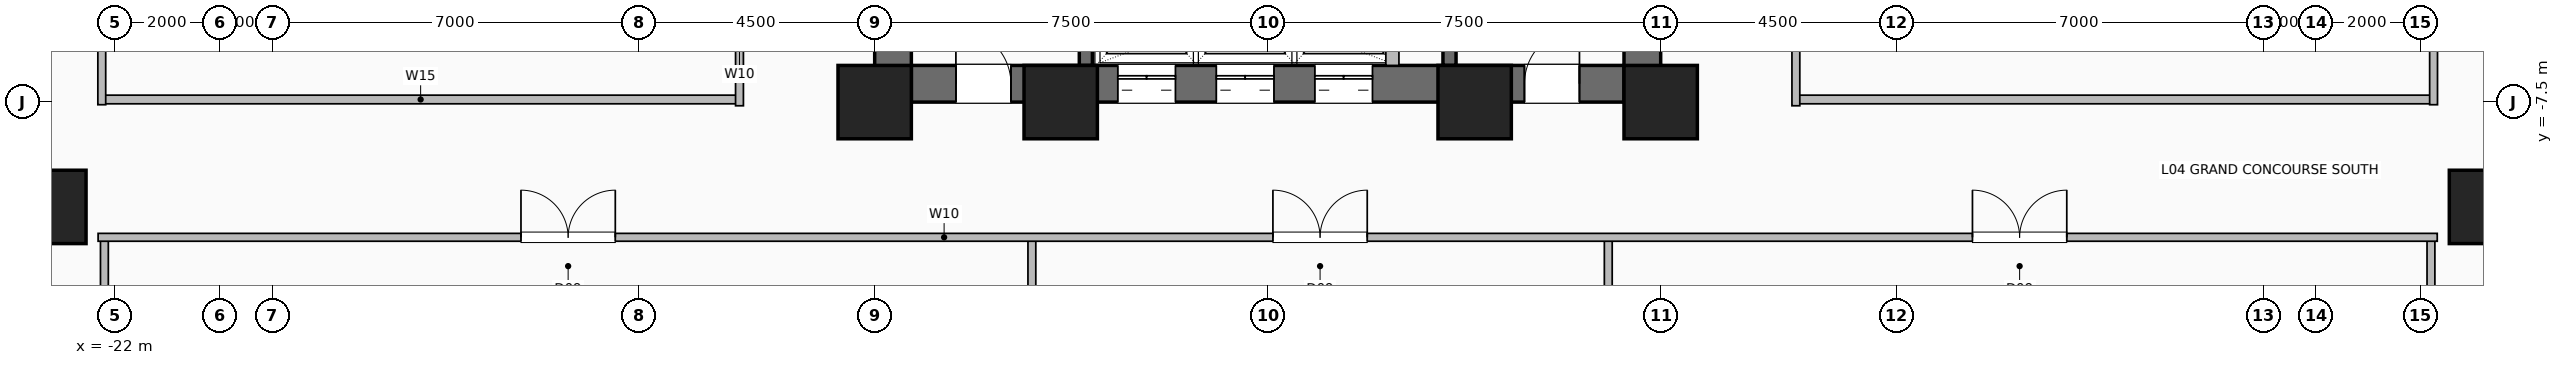
"""IFC4 building model, lengths in metres.
Left out: names, types, materials, properties, quantities, classifications, styles, units other than length and angle.
Written with IfcOpenShell. Run it as: python <this file> out.ifc"""

import sys

from ifc_helpers import new_model, si_unit, direction, frame, frame_2d, origin, origin_2d, place, context, subcontext, project, spatial, rectangle, hollow_rectangle, extrude, element, fill, save


model = new_model("IFC4")
c1 = context("Model", 3, precision=1e-05, world=origin(), true_north=direction((0.0, 1.0)))
c2 = subcontext(c1, "Body", "Model", "MODEL_VIEW")
j1 = project(units=[si_unit("LENGTHUNIT", "METRE"), si_unit("PLANEANGLEUNIT", "RADIAN")], contexts=[c1])
p1 = place(None, origin())
s1 = spatial("IfcSite", under=j1, at=p1, CompositionType="ELEMENT")
p2 = place(p1, origin())
s2 = spatial("IfcBuilding", under=s1, at=p2, CompositionType="ELEMENT")
p3 = place(p2, frame((0.0, 0.0, 21.6)))
s3 = spatial("IfcBuildingStorey", under=s2, at=p3, CompositionType="ELEMENT", Elevation=21.6)
for number, where, z_axis, x_axis in (
    (1, (-7.5, -7.5, 0.0), (0.0, 0.0, 1.0), (1.0, 0.0, 0.0)),
    (2, (-3.95, -7.5, 0.0), (0.0, 0.0, 1.0), (1.0, 0.0, 0.0)),
    (3, (3.95, -7.5, 0.0), (0.0, 0.0, 1.0), (1.0, 0.0, 0.0)),
    (4, (7.5, -7.5, 0.0), (0.0, 0.0, 1.0), (1.0, 0.0, 0.0)),
):
    element("IfcColumn", number, at=place(p3, frame(where, z_axis=z_axis, x_axis=x_axis)), inside=s3, PredefinedType="COLUMN", context=c2, shape_type="SweptSolid", body=[
        extrude(hollow_rectangle(XDim=1.4, YDim=1.4, WallThickness=0.06, at=origin_2d()), origin(), (0.0, 0.0, 1.0), 5.4),
    ])
for number, where, z_axis, x_axis in (
    (5, (-23.25, -9.5, 0.0), (0.0, 0.0, 1.0), (1.0, 0.0, 0.0)),
    (6, (23.25, -9.5, 0.0), (0.0, 0.0, 1.0), (1.0, 0.0, 0.0)),
):
    element("IfcColumn", number, at=place(p3, frame(where, z_axis=z_axis, x_axis=x_axis)), inside=s3, PredefinedType="COLUMN", context=c2, shape_type="SweptSolid", body=[
        extrude(hollow_rectangle(XDim=1.4, YDim=1.4, WallThickness=0.06, at=origin_2d()), origin(), (0.0, 0.0, 1.0), 5.0),
    ])
p4 = place(p3, frame((-7.5, -7.15, 0.0), z_axis=(0.0, 0.0, 1.0), x_axis=(1.0, 0.0, 0.0)))
e7 = element("IfcWall", 7, at=p4, inside=s3, PredefinedType="SHEAR", context=c2, shape_type="SweptSolid", body=[
    extrude(rectangle(XDim=15.0, YDim=0.7, at=frame_2d((7.5, 0.0))), origin(), (0.0, 0.0, 1.0), 5.0),
])
p5 = place(p4, frame((1.55, 0.0, 0.0)))
e8 = element("IfcOpeningElement", 8, at=p5, cuts=e7, PredefinedType="OPENING", context=c2, shape_type="SweptSolid", body=[
    extrude(rectangle(XDim=1.05, YDim=2.08, at=frame_2d((0.525, 1.04))), frame((0.0, 0.36, 0.0), z_axis=(0.0, -1.0, 0.0), x_axis=(1.0, 0.0, 0.0)), (0.0, 0.0, 1.0), 0.72),
])
p6 = place(p4, frame((12.4, 0.0, 0.0)))
e9 = element("IfcOpeningElement", 9, at=p6, cuts=e7, PredefinedType="OPENING", context=c2, shape_type="SweptSolid", body=[
    extrude(rectangle(XDim=1.05, YDim=2.08, at=frame_2d((0.525, 1.04))), frame((0.0, 0.36, 0.0), z_axis=(0.0, -1.0, 0.0), x_axis=(1.0, 0.0, 0.0)), (0.0, 0.0, 1.0), 0.72),
])
p7 = place(p4, frame((4.64, 0.0, 0.0)))
e10 = element("IfcOpeningElement", 10, at=p7, cuts=e7, PredefinedType="OPENING", context=c2, shape_type="SweptSolid", body=[
    extrude(rectangle(XDim=1.1, YDim=2.2, at=frame_2d((0.55, 1.1))), frame((0.0, 0.36, 0.0), z_axis=(0.0, -1.0, 0.0), x_axis=(1.0, 0.0, 0.0)), (0.0, 0.0, 1.0), 0.72),
])
p8 = place(p4, frame((6.52, 0.0, 0.0)))
e11 = element("IfcOpeningElement", 11, at=p8, cuts=e7, PredefinedType="OPENING", context=c2, shape_type="SweptSolid", body=[
    extrude(rectangle(XDim=1.1, YDim=2.2, at=frame_2d((0.55, 1.1))), frame((0.0, 0.36, 0.0), z_axis=(0.0, -1.0, 0.0), x_axis=(1.0, 0.0, 0.0)), (0.0, 0.0, 1.0), 0.72),
])
p9 = place(p4, frame((8.4, 0.0, 0.0)))
e12 = element("IfcOpeningElement", 12, at=p9, cuts=e7, PredefinedType="OPENING", context=c2, shape_type="SweptSolid", body=[
    extrude(rectangle(XDim=1.1, YDim=2.2, at=frame_2d((0.55, 1.1))), frame((0.0, 0.36, 0.0), z_axis=(0.0, -1.0, 0.0), x_axis=(1.0, 0.0, 0.0)), (0.0, 0.0, 1.0), 0.72),
])
p10 = place(p3, frame((-7.15, -7.5, 0.0), z_axis=(0.0, 0.0, 1.0), x_axis=(0.0, 1.0, 0.0)))
e13 = element("IfcWall", 13, at=p10, inside=s3, PredefinedType="SHEAR", context=c2, shape_type="SweptSolid", body=[
    extrude(rectangle(XDim=15.0, YDim=0.7, at=frame_2d((7.5, 0.0))), origin(), (0.0, 0.0, 1.0), 5.0),
])
p11 = place(p10, frame((9.5, 0.0, 0.0)))
e14 = element("IfcOpeningElement", 14, at=p11, cuts=e13, PredefinedType="OPENING", context=c2, shape_type="SweptSolid", body=[
    extrude(rectangle(XDim=1.0, YDim=2.08, at=frame_2d((0.5, 1.04))), frame((0.0, 0.36, 0.0), z_axis=(0.0, -1.0, 0.0), x_axis=(1.0, 0.0, 0.0)), (0.0, 0.0, 1.0), 0.72),
])
p12 = place(p3, frame((7.15, -7.5, 0.0), z_axis=(0.0, 0.0, 1.0), x_axis=(0.0, 1.0, 0.0)))
e15 = element("IfcWall", 15, at=p12, inside=s3, PredefinedType="SHEAR", context=c2, shape_type="SweptSolid", body=[
    extrude(rectangle(XDim=15.0, YDim=0.7, at=frame_2d((7.5, 0.0))), origin(), (0.0, 0.0, 1.0), 5.0),
])
p13 = place(p12, frame((12.6, 0.0, 0.0)))
e16 = element("IfcOpeningElement", 16, at=p13, cuts=e15, PredefinedType="OPENING", context=c2, shape_type="SweptSolid", body=[
    extrude(rectangle(XDim=1.2, YDim=2.2, at=frame_2d((0.6, 1.1))), frame((0.0, 0.36, 0.0), z_axis=(0.0, -1.0, 0.0), x_axis=(1.0, 0.0, 0.0)), (0.0, 0.0, 1.0), 0.72),
])
for number, where, z_axis, x_axis in (
    (17, (-3.47, -6.8, 0.0), (0.0, 0.0, 1.0), (0.0, 1.0, 0.0)),
    (18, (3.47, -6.8, 0.0), (0.0, 0.0, 1.0), (0.0, 1.0, 0.0)),
):
    element("IfcWall", number, at=place(p3, frame(where, z_axis=z_axis, x_axis=x_axis)), inside=s3, PredefinedType="SHEAR", context=c2, shape_type="SweptSolid", body=[
        extrude(rectangle(XDim=7.72, YDim=0.25, at=frame_2d((3.86, 0.0))), origin(), (0.0, 0.0, 1.0), 5.0),
    ])
p14 = place(p3, frame((2.38, -6.8, 0.0), z_axis=(0.0, 0.0, 1.0), x_axis=(0.0, 1.0, 0.0)))
e19 = element("IfcWall", 19, at=p14, inside=s3, PredefinedType="SHEAR", context=c2, shape_type="SweptSolid", body=[
    extrude(rectangle(XDim=2.22, YDim=0.25, at=frame_2d((1.11, 0.0))), origin(), (0.0, 0.0, 1.0), 5.0),
])
for number, where, z_axis, x_axis in (
    (20, (-22.2, -22.2, 0.0), (0.0, 0.0, 1.0), (0.0, 1.0, 0.0)),
    (21, (-4.5, -22.2, 0.0), (0.0, 0.0, 1.0), (0.0, 1.0, 0.0)),
    (22, (6.5, -22.2, 0.0), (0.0, 0.0, 1.0), (0.0, 1.0, 0.0)),
    (23, (22.2, -22.2, 0.0), (0.0, 0.0, 1.0), (0.0, 1.0, 0.0)),
):
    element("IfcWall", number, at=place(p3, frame(where, z_axis=z_axis, x_axis=x_axis)), inside=s3, PredefinedType="PARTITIONING", context=c2, shape_type="SweptSolid", body=[
        extrude(rectangle(XDim=12.12, YDim=0.15, at=frame_2d((6.06, 0.0))), origin(), (0.0, 0.0, 1.0), 5.0),
    ])
p15 = place(p3, frame((-22.32, -10.08, 0.0), z_axis=(0.0, 0.0, 1.0), x_axis=(1.0, 0.0, 0.0)))
e24 = element("IfcWall", 24, at=p15, inside=s3, PredefinedType="PARTITIONING", context=c2, shape_type="SweptSolid", body=[
    extrude(rectangle(XDim=44.64, YDim=0.15, at=frame_2d((22.32, 0.0))), origin(), (0.0, 0.0, 1.0), 5.0),
])
p16 = place(p15, frame((8.07, 0.0, 0.0)))
e25 = element("IfcOpeningElement", 25, at=p16, cuts=e24, PredefinedType="OPENING", context=c2, shape_type="SweptSolid", body=[
    extrude(rectangle(XDim=1.8, YDim=2.08, at=frame_2d((0.9, 1.04))), frame((0.0, 0.085, 0.0), z_axis=(0.0, -1.0, 0.0), x_axis=(1.0, 0.0, 0.0)), (0.0, 0.0, 1.0), 0.17),
])
p17 = place(p15, frame((22.42, 0.0, 0.0)))
e26 = element("IfcOpeningElement", 26, at=p17, cuts=e24, PredefinedType="OPENING", context=c2, shape_type="SweptSolid", body=[
    extrude(rectangle(XDim=1.8, YDim=2.08, at=frame_2d((0.9, 1.04))), frame((0.0, 0.085, 0.0), z_axis=(0.0, -1.0, 0.0), x_axis=(1.0, 0.0, 0.0)), (0.0, 0.0, 1.0), 0.17),
])
p18 = place(p15, frame((35.77, 0.0, 0.0)))
e27 = element("IfcOpeningElement", 27, at=p18, cuts=e24, PredefinedType="OPENING", context=c2, shape_type="SweptSolid", body=[
    extrude(rectangle(XDim=1.8, YDim=2.08, at=frame_2d((0.9, 1.04))), frame((0.0, 0.085, 0.0), z_axis=(0.0, -1.0, 0.0), x_axis=(1.0, 0.0, 0.0)), (0.0, 0.0, 1.0), 0.17),
])
p19 = place(p3, frame((-22.25, -7.45, 0.0), z_axis=(0.0, 0.0, 1.0), x_axis=(1.0, 0.0, 0.0)))
e28 = element("IfcWall", 28, at=p19, inside=s3, PredefinedType="PLUMBINGWALL", context=c2, shape_type="SweptSolid", body=[
    extrude(rectangle(XDim=12.17, YDim=0.165, at=frame_2d((6.085, 0.0))), origin(), (0.0, 0.0, 1.0), 5.0),
])
p20 = place(p3, frame((-10.08, -7.57, 0.0), z_axis=(0.0, 0.0, 1.0), x_axis=(0.0, 1.0, 0.0)))
e29 = element("IfcWall", 29, at=p20, inside=s3, PredefinedType="PARTITIONING", context=c2, shape_type="SweptSolid", body=[
    extrude(rectangle(XDim=15.14, YDim=0.15, at=frame_2d((7.57, 0.0))), origin(), (0.0, 0.0, 1.0), 5.0),
])
p21 = place(p20, frame((2.37, 0.0, 0.0)))
e30 = element("IfcOpeningElement", 30, at=p21, cuts=e29, PredefinedType="OPENING", context=c2, shape_type="SweptSolid", body=[
    extrude(rectangle(XDim=0.95, YDim=2.06, at=frame_2d((0.475, 1.03))), frame((0.0, 0.085, 0.0), z_axis=(0.0, -1.0, 0.0), x_axis=(1.0, 0.0, 0.0)), (0.0, 0.0, 1.0), 0.17),
])
p22 = place(p20, frame((5.875, 0.0, 0.0)))
e31 = element("IfcOpeningElement", 31, at=p22, cuts=e29, PredefinedType="OPENING", context=c2, shape_type="SweptSolid", body=[
    extrude(rectangle(XDim=0.85, YDim=2.05, at=frame_2d((0.425, 1.025))), frame((0.0, 0.085, 0.0), z_axis=(0.0, -1.0, 0.0), x_axis=(1.0, 0.0, 0.0)), (0.0, 0.0, 1.0), 0.17),
])
p23 = place(p20, frame((8.925, 0.0, 0.0)))
e32 = element("IfcOpeningElement", 32, at=p23, cuts=e29, PredefinedType="OPENING", context=c2, shape_type="SweptSolid", body=[
    extrude(rectangle(XDim=0.95, YDim=2.06, at=frame_2d((0.475, 1.03))), frame((0.0, 0.085, 0.0), z_axis=(0.0, -1.0, 0.0), x_axis=(1.0, 0.0, 0.0)), (0.0, 0.0, 1.0), 0.17),
])
p24 = place(p20, frame((12.08, 0.0, 0.0)))
e33 = element("IfcOpeningElement", 33, at=p24, cuts=e29, PredefinedType="OPENING", context=c2, shape_type="SweptSolid", body=[
    extrude(rectangle(XDim=0.85, YDim=2.05, at=frame_2d((0.425, 1.025))), frame((0.0, 0.085, 0.0), z_axis=(0.0, -1.0, 0.0), x_axis=(1.0, 0.0, 0.0)), (0.0, 0.0, 1.0), 0.17),
])
p25 = place(p20, frame((13.655, 0.0, 0.0)))
e34 = element("IfcOpeningElement", 34, at=p25, cuts=e29, PredefinedType="OPENING", context=c2, shape_type="SweptSolid", body=[
    extrude(rectangle(XDim=0.95, YDim=2.06, at=frame_2d((0.475, 1.03))), frame((0.0, 0.085, 0.0), z_axis=(0.0, -1.0, 0.0), x_axis=(1.0, 0.0, 0.0)), (0.0, 0.0, 1.0), 0.17),
])
p26 = place(p3, frame((10.08, -7.45, 0.0), z_axis=(0.0, 0.0, 1.0), x_axis=(1.0, 0.0, 0.0)))
e35 = element("IfcWall", 35, at=p26, inside=s3, PredefinedType="PLUMBINGWALL", context=c2, shape_type="SweptSolid", body=[
    extrude(rectangle(XDim=12.17, YDim=0.165, at=frame_2d((6.085, 0.0))), origin(), (0.0, 0.0, 1.0), 5.0),
])
p27 = place(p3, frame((10.08, -7.57, 0.0), z_axis=(0.0, 0.0, 1.0), x_axis=(0.0, 1.0, 0.0)))
e36 = element("IfcWall", 36, at=p27, inside=s3, PredefinedType="PARTITIONING", context=c2, shape_type="SweptSolid", body=[
    extrude(rectangle(XDim=9.24, YDim=0.15, at=frame_2d((4.62, 0.0))), origin(), (0.0, 0.0, 1.0), 5.0),
])
p28 = place(p27, frame((1.62, 0.0, 0.0)))
e37 = element("IfcOpeningElement", 37, at=p28, cuts=e36, PredefinedType="OPENING", context=c2, shape_type="SweptSolid", body=[
    extrude(rectangle(XDim=0.95, YDim=2.06, at=frame_2d((0.475, 1.03))), frame((0.0, 0.085, 0.0), z_axis=(0.0, -1.0, 0.0), x_axis=(1.0, 0.0, 0.0)), (0.0, 0.0, 1.0), 0.17),
])
p29 = place(p27, frame((4.785, 0.0, 0.0)))
e38 = element("IfcOpeningElement", 38, at=p29, cuts=e36, PredefinedType="OPENING", context=c2, shape_type="SweptSolid", body=[
    extrude(rectangle(XDim=0.85, YDim=2.05, at=frame_2d((0.425, 1.025))), frame((0.0, 0.085, 0.0), z_axis=(0.0, -1.0, 0.0), x_axis=(1.0, 0.0, 0.0)), (0.0, 0.0, 1.0), 0.17),
])
p30 = place(p27, frame((7.26, 0.0, 0.0)))
e39 = element("IfcOpeningElement", 39, at=p30, cuts=e36, PredefinedType="OPENING", context=c2, shape_type="SweptSolid", body=[
    extrude(rectangle(XDim=0.95, YDim=2.06, at=frame_2d((0.475, 1.03))), frame((0.0, 0.085, 0.0), z_axis=(0.0, -1.0, 0.0), x_axis=(1.0, 0.0, 0.0)), (0.0, 0.0, 1.0), 0.17),
])
p31 = place(p3, frame((-22.25, -7.55, 0.0), z_axis=(0.0, 0.0, 1.0), x_axis=(0.0, 1.0, 0.0)))
e40 = element("IfcWall", 40, at=p31, inside=s3, PredefinedType="PARTITIONING", context=c2, shape_type="SweptSolid", body=[
    extrude(rectangle(XDim=15.1, YDim=0.15, at=frame_2d((7.55, 0.0))), origin(), (0.0, 0.0, 1.0), 5.0),
])
p32 = place(p3, frame((22.25, -7.55, 0.0), z_axis=(0.0, 0.0, 1.0), x_axis=(0.0, 1.0, 0.0)))
e41 = element("IfcWall", 41, at=p32, inside=s3, PredefinedType="PARTITIONING", context=c2, shape_type="SweptSolid", body=[
    extrude(rectangle(XDim=9.2, YDim=0.15, at=frame_2d((4.6, 0.0))), origin(), (0.0, 0.0, 1.0), 5.0),
])
p33 = place(p5, origin())
e42 = element("IfcDoor", 42, at=p33, inside=s3, OperationType="SINGLE_SWING_LEFT", PredefinedType="DOOR", context=c2, shape_type="SweptSolid", body=[
    extrude(rectangle(XDim=1.05, YDim=2.08, at=frame_2d((0.525, 1.04))), frame((0.0, 0.025, 0.0), z_axis=(0.0, -1.0, 0.0), x_axis=(1.0, 0.0, 0.0)), (0.0, 0.0, 1.0), 0.05),
])
fill(e8, e42)
p34 = place(p6, origin())
e43 = element("IfcDoor", 43, at=p34, inside=s3, OperationType="SINGLE_SWING_RIGHT", PredefinedType="DOOR", context=c2, shape_type="SweptSolid", body=[
    extrude(rectangle(XDim=1.05, YDim=2.08, at=frame_2d((0.525, 1.04))), frame((0.0, 0.025, 0.0), z_axis=(0.0, -1.0, 0.0), x_axis=(1.0, 0.0, 0.0)), (0.0, 0.0, 1.0), 0.05),
])
fill(e9, e43)
p35 = place(p7, origin())
e44 = element("IfcDoor", 44, at=p35, inside=s3, OperationType="DOUBLE_DOOR_SLIDING", PredefinedType="DOOR", context=c2, shape_type="SweptSolid", body=[
    extrude(rectangle(XDim=1.1, YDim=2.2, at=frame_2d((0.55, 1.1))), frame((0.0, 0.025, 0.0), z_axis=(0.0, -1.0, 0.0), x_axis=(1.0, 0.0, 0.0)), (0.0, 0.0, 1.0), 0.05),
])
fill(e10, e44)
p36 = place(p8, origin())
e45 = element("IfcDoor", 45, at=p36, inside=s3, OperationType="DOUBLE_DOOR_SLIDING", PredefinedType="DOOR", context=c2, shape_type="SweptSolid", body=[
    extrude(rectangle(XDim=1.1, YDim=2.2, at=frame_2d((0.55, 1.1))), frame((0.0, 0.025, 0.0), z_axis=(0.0, -1.0, 0.0), x_axis=(1.0, 0.0, 0.0)), (0.0, 0.0, 1.0), 0.05),
])
fill(e11, e45)
p37 = place(p9, origin())
e46 = element("IfcDoor", 46, at=p37, inside=s3, OperationType="DOUBLE_DOOR_SLIDING", PredefinedType="DOOR", context=c2, shape_type="SweptSolid", body=[
    extrude(rectangle(XDim=1.1, YDim=2.2, at=frame_2d((0.55, 1.1))), frame((0.0, 0.025, 0.0), z_axis=(0.0, -1.0, 0.0), x_axis=(1.0, 0.0, 0.0)), (0.0, 0.0, 1.0), 0.05),
])
fill(e12, e46)
p38 = place(p16, origin())
e47 = element("IfcDoor", 47, at=p38, inside=s3, OperationType="DOUBLE_DOOR_SINGLE_SWING", PredefinedType="DOOR", context=c2, shape_type="SweptSolid", body=[
    extrude(rectangle(XDim=1.8, YDim=2.08, at=frame_2d((0.9, 1.04))), frame((0.0, 0.025, 0.0), z_axis=(0.0, -1.0, 0.0), x_axis=(1.0, 0.0, 0.0)), (0.0, 0.0, 1.0), 0.05),
])
fill(e25, e47)
p39 = place(p17, origin())
e48 = element("IfcDoor", 48, at=p39, inside=s3, OperationType="DOUBLE_DOOR_SINGLE_SWING", PredefinedType="DOOR", context=c2, shape_type="SweptSolid", body=[
    extrude(rectangle(XDim=1.8, YDim=2.08, at=frame_2d((0.9, 1.04))), frame((0.0, 0.025, 0.0), z_axis=(0.0, -1.0, 0.0), x_axis=(1.0, 0.0, 0.0)), (0.0, 0.0, 1.0), 0.05),
])
fill(e26, e48)
p40 = place(p18, origin())
e49 = element("IfcDoor", 49, at=p40, inside=s3, OperationType="DOUBLE_DOOR_SINGLE_SWING", PredefinedType="DOOR", context=c2, shape_type="SweptSolid", body=[
    extrude(rectangle(XDim=1.8, YDim=2.08, at=frame_2d((0.9, 1.04))), frame((0.0, 0.025, 0.0), z_axis=(0.0, -1.0, 0.0), x_axis=(1.0, 0.0, 0.0)), (0.0, 0.0, 1.0), 0.05),
])
fill(e27, e49)
save(model, sys.argv[1])
